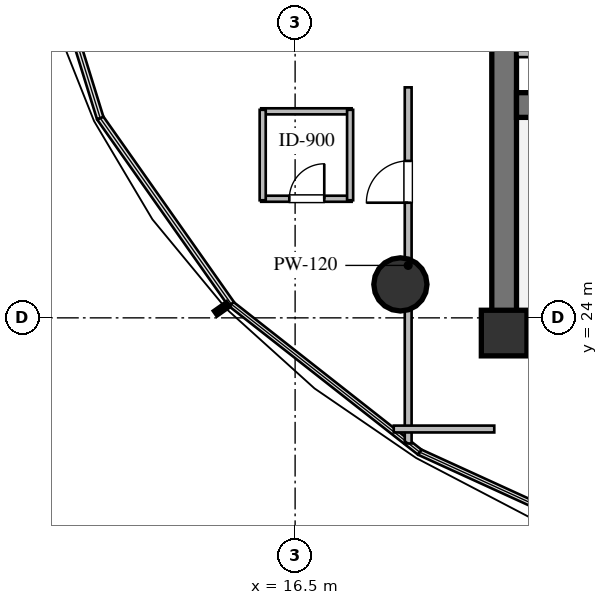
"""IFC4 building model, lengths in metres.
Left out: names, types, materials, properties, quantities, classifications, styles, units other than length and angle.
Written with IfcOpenShell. Run it as: python <this file> out.ifc"""

import sys

from ifc_helpers import new_model, si_unit, direction, frame, frame_2d, origin, origin_2d, place, context, subcontext, project, spatial, rectangle, circle, extrude, element, fill, save


model = new_model("IFC4")
c1 = context("Model", 3, precision=1e-05, world=origin(), true_north=direction((0.0, 1.0)))
c2 = subcontext(c1, "Body", "Model", "MODEL_VIEW")
j1 = project(units=[si_unit("LENGTHUNIT", "METRE"), si_unit("PLANEANGLEUNIT", "RADIAN")], contexts=[c1])
p1 = place(None, origin())
s1 = spatial("IfcSite", under=j1, at=p1, CompositionType="ELEMENT")
p2 = place(p1, origin())
s2 = spatial("IfcBuilding", under=s1, at=p2, CompositionType="ELEMENT")
p3 = place(p2, frame((0.0, 0.0, 63.6)))
s3 = spatial("IfcBuildingStorey", under=s2, at=p3, CompositionType="ELEMENT", Elevation=63.6)
p4 = place(p3, frame((21.675, 23.6, 0.0), z_axis=(0.0, 0.0, 1.0), x_axis=(1.0, 0.0, 0.0)))
e1 = element("IfcWall", 1, at=p4, inside=s3, PredefinedType="SHEAR", context=c2, shape_type="SweptSolid", body=[
    extrude(rectangle(XDim=22.65, YDim=0.65, at=frame_2d((11.325, 0.0))), origin(), (0.0, 0.0, 1.0), 3.36),
])
p5 = place(p3, frame((22.0, 23.925, 0.0), z_axis=(0.0, 0.0, 1.0), x_axis=(0.0, 1.0, 0.0)))
e2 = element("IfcWall", 2, at=p5, inside=s3, PredefinedType="SHEAR", context=c2, shape_type="SweptSolid", body=[
    extrude(rectangle(XDim=12.15, YDim=0.65, at=frame_2d((6.075, 0.0))), origin(), (0.0, 0.0, 1.0), 3.36),
])
p6 = place(p3, frame((22.325, 29.6, 0.0), z_axis=(0.0, 0.0, 1.0), x_axis=(1.0, 0.0, 0.0)))
e3 = element("IfcWall", 3, at=p6, inside=s3, PredefinedType="SHEAR", context=c2, shape_type="SweptSolid", body=[
    extrude(rectangle(XDim=21.35, YDim=0.65, at=frame_2d((10.675, 0.0))), origin(), (0.0, 0.0, 1.0), 3.36),
])
p7 = place(p6, frame((12.125, 0.0, 0.0)))
e4 = element("IfcOpeningElement", 4, at=p7, cuts=e3, PredefinedType="OPENING", context=c2, shape_type="SweptSolid", body=[
    extrude(rectangle(XDim=1.15, YDim=2.1, at=frame_2d((0.575, 1.05))), frame((0.0, 0.335, 0.0), z_axis=(0.0, -1.0, 0.0), x_axis=(1.0, 0.0, 0.0)), (0.0, 0.0, 1.0), 0.67),
])
p8 = place(p3, frame((22.0, 23.6, 0.0), z_axis=(0.0, 0.0, 1.0), x_axis=(1.0, 0.0, 0.0)))
e5 = element("IfcColumn", 5, at=p8, inside=s3, PredefinedType="COLUMN", context=c2, shape_type="SweptSolid", body=[
    extrude(rectangle(XDim=1.2, YDim=1.2, at=origin_2d()), origin(), (0.0, 0.0, 1.0), 3.6),
])
p9 = place(p3, frame((19.27, 24.88, 0.0), z_axis=(0.0, 0.0, 1.0), x_axis=(1.0, 0.0, 0.0)))
e6 = element("IfcColumn", 6, at=p9, inside=s3, PredefinedType="COLUMN", context=c2, shape_type="SweptSolid", body=[
    extrude(circle(Radius=0.7, at=origin_2d()), origin(), (0.0, 0.0, 1.0), 3.6),
])
p10 = place(p3, frame((22.35, 30.95, 0.0), z_axis=(0.0, 0.0, 1.0), x_axis=(1.0, 0.0, 0.0)))
e7 = element("IfcWall", 7, at=p10, inside=s3, PredefinedType="PARTITIONING", context=c2, shape_type="SweptSolid", body=[
    extrude(rectangle(XDim=3.75, YDim=0.18, at=frame_2d((1.875, 0.0))), origin(), (0.0, 0.0, 1.0), 3.36),
])
p11 = place(p10, frame((1.988, 0.0, 0.0)))
e8 = element("IfcOpeningElement", 8, at=p11, cuts=e7, PredefinedType="OPENING", context=c2, shape_type="SweptSolid", body=[
    extrude(rectangle(XDim=0.92, YDim=2.1, at=frame_2d((0.46, 1.05))), frame((0.0, 0.1, 0.0), z_axis=(0.0, -1.0, 0.0), x_axis=(1.0, 0.0, 0.0)), (0.0, 0.0, 1.0), 0.2),
])
p12 = place(p3, frame((15.607, 27.134, 0.0), z_axis=(0.0, 0.0, 1.0), x_axis=(1.0, 0.0, 0.0)))
e9 = element("IfcWall", 9, at=p12, inside=s3, PredefinedType="PLUMBINGWALL", context=c2, shape_type="SweptSolid", body=[
    extrude(rectangle(XDim=2.38, YDim=0.16, at=frame_2d((1.19, 0.0))), origin(), (0.0, 0.0, 1.0), 3.36),
])
p13 = place(p12, frame((0.74, 0.0, 0.0)))
e10 = element("IfcOpeningElement", 10, at=p13, cuts=e9, PredefinedType="OPENING", context=c2, shape_type="SweptSolid", body=[
    extrude(rectangle(XDim=0.92, YDim=2.1, at=frame_2d((0.46, 1.05))), frame((0.0, 0.09, 0.0), z_axis=(0.0, -1.0, 0.0), x_axis=(1.0, 0.0, 0.0)), (0.0, 0.0, 1.0), 0.18),
])
for number, where, z_axis, x_axis in (
    (11, (15.607, 29.434, 0.0), (0.0, 0.0, 1.0), (1.0, 0.0, 0.0)),
    (12, (15.647, 27.094, 0.0), (0.0, 0.0, 1.0), (0.0, 1.0, 0.0)),
):
    element("IfcWall", number, at=place(p3, frame(where, z_axis=z_axis, x_axis=x_axis)), inside=s3, PredefinedType="PLUMBINGWALL", context=c2, shape_type="SweptSolid", body=[
        extrude(rectangle(XDim=2.38, YDim=0.16, at=frame_2d((1.19, 0.0))), origin(), (0.0, 0.0, 1.0), 3.36),
    ])
p14 = place(p3, frame((17.947, 27.094, 0.0), z_axis=(0.0, 0.0, 1.0), x_axis=(0.0, 1.0, 0.0)))
e13 = element("IfcWall", 13, at=p14, inside=s3, PredefinedType="PLUMBINGWALL", context=c2, shape_type="SweptSolid", body=[
    extrude(rectangle(XDim=2.38, YDim=0.16, at=frame_2d((1.19, 0.0))), origin(), (0.0, 0.0, 1.0), 2.738),
])
p15 = place(p3, frame((19.475, 20.695, 0.0), z_axis=(0.0, 0.0, 1.0), x_axis=(0.0, 1.0, 0.0)))
e14 = element("IfcWall", 14, at=p15, inside=s3, PredefinedType="PARTITIONING", context=c2, shape_type="SweptSolid", body=[
    extrude(rectangle(XDim=9.37, YDim=0.18, at=frame_2d((4.685, 0.0))), origin(), (0.0, 0.0, 1.0), 2.738),
])
p16 = place(p15, frame((6.335, 0.0, 0.0)))
e15 = element("IfcOpeningElement", 15, at=p16, cuts=e14, PredefinedType="OPENING", context=c2, shape_type="SweptSolid", body=[
    extrude(rectangle(XDim=1.1, YDim=2.1, at=frame_2d((0.55, 1.05))), frame((0.0, 0.1, 0.0), z_axis=(0.0, -1.0, 0.0), x_axis=(1.0, 0.0, 0.0)), (0.0, 0.0, 1.0), 0.2),
])
p17 = place(p3, frame((21.74, 21.075, 0.0), z_axis=(0.0, 0.0, 1.0), x_axis=(-1.0, 0.0, 0.0)))
e16 = element("IfcWall", 16, at=p17, inside=s3, PredefinedType="PARTITIONING", context=c2, shape_type="SweptSolid", body=[
    extrude(rectangle(XDim=2.645, YDim=0.18, at=frame_2d((1.323, 0.0))), origin(), (0.0, 0.0, 1.0), 3.36),
])
p18 = place(p13, origin())
e17 = element("IfcDoor", 17, at=p18, inside=s3, OperationType="SINGLE_SWING_RIGHT", PredefinedType="DOOR", context=c2, shape_type="SweptSolid", body=[
    extrude(rectangle(XDim=0.92, YDim=2.1, at=frame_2d((0.46, 1.05))), frame((0.0, 0.025, 0.0), z_axis=(0.0, -1.0, 0.0), x_axis=(1.0, 0.0, 0.0)), (0.0, 0.0, 1.0), 0.05),
])
fill(e10, e17)
p19 = place(p16, origin())
e18 = element("IfcDoor", 18, at=p19, inside=s3, OperationType="SINGLE_SWING_LEFT", PredefinedType="DOOR", context=c2, shape_type="SweptSolid", body=[
    extrude(rectangle(XDim=1.1, YDim=2.1, at=frame_2d((0.55, 1.05))), frame((0.0, 0.025, 0.0), z_axis=(0.0, -1.0, 0.0), x_axis=(1.0, 0.0, 0.0)), (0.0, 0.0, 1.0), 0.05),
])
fill(e15, e18)
save(model, sys.argv[1])
